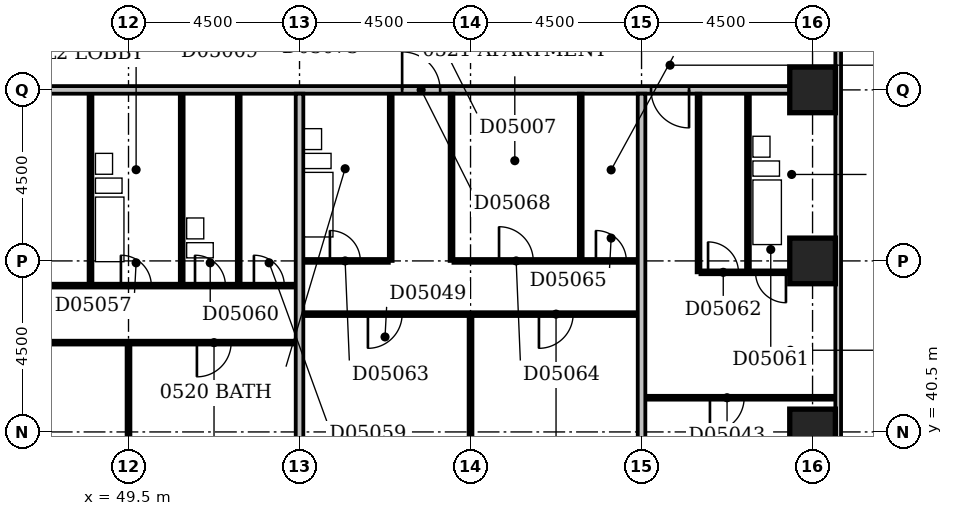
"""IFC4 building model, lengths in metres.
Left out: names, types, materials, properties, quantities, classifications, styles, units other than length and angle.
Written with IfcOpenShell. Run it as: python <this file> out.ifc"""

import sys

from ifc_helpers import new_model, si_unit, direction, frame, frame_2d, origin, origin_2d, place, context, subcontext, project, spatial, rectangle, extrude, element, fill, save


model = new_model("IFC4")
c1 = context("Model", 3, precision=1e-05, world=origin(), true_north=direction((0.0, 1.0)))
c2 = subcontext(c1, "Body", "Model", "MODEL_VIEW")
j1 = project(units=[si_unit("LENGTHUNIT", "METRE"), si_unit("PLANEANGLEUNIT", "RADIAN")], contexts=[c1])
p1 = place(None, origin())
s1 = spatial("IfcSite", under=j1, at=p1, CompositionType="ELEMENT")
p2 = place(p1, origin())
s2 = spatial("IfcBuilding", under=s1, at=p2, CompositionType="ELEMENT")
p3 = place(p2, frame((0.0, 0.0, 29.0)))
s3 = spatial("IfcBuildingStorey", under=s2, at=p3, CompositionType="ELEMENT", Elevation=29.0)
for number, where, z_axis, x_axis in (
    (1, (67.5, 40.5, -0.3), (0.0, 0.0, 1.0), (1.0, 0.0, 0.0)),
    (2, (67.5, 45.0, -0.3), (0.0, 0.0, 1.0), (1.0, 0.0, 0.0)),
    (3, (67.5, 49.5, -0.3), (0.0, 0.0, 1.0), (1.0, 0.0, 0.0)),
):
    element("IfcColumn", number, at=place(p3, frame(where, z_axis=z_axis, x_axis=x_axis)), inside=s3, PredefinedType="COLUMN", context=c2, shape_type="SweptSolid", body=[
        extrude(rectangle(XDim=1.2, YDim=1.2, at=origin_2d()), origin(), (0.0, 0.0, 1.0), 3.6),
    ])
p4 = place(p3, frame((68.175, 35.4, 0.0), z_axis=(0.0, 0.0, 1.0), x_axis=(0.0, 1.0, 0.0)))
e4 = element("IfcWall", 4, at=p4, inside=s3, PredefinedType="STANDARD", context=c2, shape_type="SweptSolid", body=[
    extrude(rectangle(XDim=23.85, YDim=0.15, at=frame_2d((11.925, 0.0))), origin(), (0.0, 0.0, 1.0), 2.7),
])
p5 = place(p4, frame((1.65, 0.0, 0.6)))
e5 = element("IfcOpeningElement", 5, at=p5, cuts=e4, PredefinedType="OPENING", context=c2, shape_type="SweptSolid", body=[
    extrude(rectangle(XDim=2.4, YDim=1.8, at=frame_2d((1.2, 0.9))), frame((0.0, 0.087, 0.0), z_axis=(0.0, -1.0, 0.0), x_axis=(1.0, 0.0, 0.0)), (0.0, 0.0, 1.0), 0.174),
])
p6 = place(p4, frame((19.65, 0.0, 0.6)))
e6 = element("IfcOpeningElement", 6, at=p6, cuts=e4, PredefinedType="OPENING", context=c2, shape_type="SweptSolid", body=[
    extrude(rectangle(XDim=2.4, YDim=1.8, at=frame_2d((1.2, 0.9))), frame((0.0, 0.087, 0.0), z_axis=(0.0, -1.0, 0.0), x_axis=(1.0, 0.0, 0.0)), (0.0, 0.0, 1.0), 0.174),
])
p7 = place(p3, frame((49.5, 36.6, 0.0), z_axis=(0.0, 0.0, 1.0), x_axis=(0.0, 1.0, 0.0)))
e7 = element("IfcWall", 7, at=p7, inside=s3, PredefinedType="PARTITIONING", context=c2, shape_type="SweptSolid", body=[
    extrude(rectangle(XDim=6.2, YDim=0.1, at=frame_2d((3.1, 0.0))), origin(), (0.0, 0.0, 1.0), 3.3),
])
p8 = place(p3, frame((54.0, 36.6, 0.0), z_axis=(0.0, 0.0, 1.0), x_axis=(0.0, 1.0, 0.0)))
e8 = element("IfcWall", 8, at=p8, inside=s3, PredefinedType="PARTITIONING", context=c2, shape_type="SweptSolid", body=[
    extrude(rectangle(XDim=12.8, YDim=0.2, at=frame_2d((6.4, 0.0))), origin(), (0.0, 0.0, 1.0), 2.6),
])
p9 = place(p3, frame((58.5, 36.6, 0.0), z_axis=(0.0, 0.0, 1.0), x_axis=(0.0, 1.0, 0.0)))
e9 = element("IfcWall", 9, at=p9, inside=s3, PredefinedType="PARTITIONING", context=c2, shape_type="SweptSolid", body=[
    extrude(rectangle(XDim=6.95, YDim=0.1, at=frame_2d((3.475, 0.0))), origin(), (0.0, 0.0, 1.0), 3.3),
])
p10 = place(p3, frame((63.0, 36.6, 0.0), z_axis=(0.0, 0.0, 1.0), x_axis=(0.0, 1.0, 0.0)))
e10 = element("IfcWall", 10, at=p10, inside=s3, PredefinedType="PARTITIONING", context=c2, shape_type="SweptSolid", body=[
    extrude(rectangle(XDim=12.8, YDim=0.2, at=frame_2d((6.4, 0.0))), origin(), (0.0, 0.0, 1.0), 2.4),
])
p11 = place(p3, frame((63.1, 41.4, 0.0), z_axis=(0.0, 0.0, 1.0), x_axis=(1.0, 0.0, 0.0)))
e11 = element("IfcWall", 11, at=p11, inside=s3, PredefinedType="PARTITIONING", context=c2, shape_type="SweptSolid", body=[
    extrude(rectangle(XDim=5.0, YDim=0.1, at=frame_2d((2.5, 0.0))), origin(), (0.0, 0.0, 1.0), 3.3),
])
p12 = place(p11, frame((1.7, 0.0, 0.0)))
e12 = element("IfcOpeningElement", 12, at=p12, cuts=e11, PredefinedType="OPENING", context=c2, shape_type="SweptSolid", body=[
    extrude(rectangle(XDim=0.9, YDim=2.1, at=frame_2d((0.45, 1.05))), frame((0.0, 0.062, 0.0), z_axis=(0.0, -1.0, 0.0), x_axis=(1.0, 0.0, 0.0)), (0.0, 0.0, 1.0), 0.124),
])
p13 = place(p3, frame((40.6, 42.85, 0.0), z_axis=(0.0, 0.0, 1.0), x_axis=(1.0, 0.0, 0.0)))
e13 = element("IfcWall", 13, at=p13, inside=s3, PredefinedType="PARTITIONING", context=c2, shape_type="SweptSolid", body=[
    extrude(rectangle(XDim=13.3, YDim=0.1, at=frame_2d((6.65, 0.0))), origin(), (0.0, 0.0, 1.0), 3.3),
])
p14 = place(p13, frame((3.9, 0.0, 0.0)))
e14 = element("IfcOpeningElement", 14, at=p14, cuts=e13, PredefinedType="OPENING", context=c2, shape_type="SweptSolid", body=[
    extrude(rectangle(XDim=0.9, YDim=2.1, at=frame_2d((0.45, 1.05))), frame((0.0, 0.062, 0.0), z_axis=(0.0, -1.0, 0.0), x_axis=(1.0, 0.0, 0.0)), (0.0, 0.0, 1.0), 0.124),
])
p15 = place(p13, frame((10.7, 0.0, 0.0)))
e15 = element("IfcOpeningElement", 15, at=p15, cuts=e13, PredefinedType="OPENING", context=c2, shape_type="SweptSolid", body=[
    extrude(rectangle(XDim=0.9, YDim=2.1, at=frame_2d((0.45, 1.05))), frame((0.0, 0.062, 0.0), z_axis=(0.0, -1.0, 0.0), x_axis=(1.0, 0.0, 0.0)), (0.0, 0.0, 1.0), 0.124),
])
p16 = place(p3, frame((54.1, 43.6, 0.0), z_axis=(0.0, 0.0, 1.0), x_axis=(1.0, 0.0, 0.0)))
e16 = element("IfcWall", 16, at=p16, inside=s3, PredefinedType="PARTITIONING", context=c2, shape_type="SweptSolid", body=[
    extrude(rectangle(XDim=8.8, YDim=0.1, at=frame_2d((4.4, 0.0))), origin(), (0.0, 0.0, 1.0), 3.3),
])
p17 = place(p16, frame((1.7, 0.0, 0.0)))
e17 = element("IfcOpeningElement", 17, at=p17, cuts=e16, PredefinedType="OPENING", context=c2, shape_type="SweptSolid", body=[
    extrude(rectangle(XDim=0.9, YDim=2.1, at=frame_2d((0.45, 1.05))), frame((0.0, 0.062, 0.0), z_axis=(0.0, -1.0, 0.0), x_axis=(1.0, 0.0, 0.0)), (0.0, 0.0, 1.0), 0.124),
])
p18 = place(p16, frame((6.2, 0.0, 0.0)))
e18 = element("IfcOpeningElement", 18, at=p18, cuts=e16, PredefinedType="OPENING", context=c2, shape_type="SweptSolid", body=[
    extrude(rectangle(XDim=0.9, YDim=2.1, at=frame_2d((0.45, 1.05))), frame((0.0, 0.062, 0.0), z_axis=(0.0, -1.0, 0.0), x_axis=(1.0, 0.0, 0.0)), (0.0, 0.0, 1.0), 0.124),
])
p19 = place(p3, frame((42.15, 44.35, 0.0), z_axis=(0.0, 0.0, 1.0), x_axis=(1.0, 0.0, 0.0)))
e19 = element("IfcWall", 19, at=p19, inside=s3, PredefinedType="PARTITIONING", context=c2, shape_type="SweptSolid", body=[
    extrude(rectangle(XDim=11.75, YDim=0.1, at=frame_2d((5.875, 0.0))), origin(), (0.0, 0.0, 1.0), 3.3),
])
p20 = place(p19, frame((7.15, 0.0, 0.0)))
e20 = element("IfcOpeningElement", 20, at=p20, cuts=e19, PredefinedType="OPENING", context=c2, shape_type="SweptSolid", body=[
    extrude(rectangle(XDim=0.8, YDim=2.1, at=frame_2d((0.4, 1.05))), frame((0.0, 0.062, 0.0), z_axis=(0.0, -1.0, 0.0), x_axis=(1.0, 0.0, 0.0)), (0.0, 0.0, 1.0), 0.124),
])
p21 = place(p19, frame((2.7, 0.0, 0.0)))
e21 = element("IfcOpeningElement", 21, at=p21, cuts=e19, PredefinedType="OPENING", context=c2, shape_type="SweptSolid", body=[
    extrude(rectangle(XDim=0.9, YDim=2.1, at=frame_2d((0.45, 1.05))), frame((0.0, 0.062, 0.0), z_axis=(0.0, -1.0, 0.0), x_axis=(1.0, 0.0, 0.0)), (0.0, 0.0, 1.0), 0.124),
])
p22 = place(p19, frame((10.65, 0.0, 0.0)))
e22 = element("IfcOpeningElement", 22, at=p22, cuts=e19, PredefinedType="OPENING", context=c2, shape_type="SweptSolid", body=[
    extrude(rectangle(XDim=0.8, YDim=2.1, at=frame_2d((0.4, 1.05))), frame((0.0, 0.062, 0.0), z_axis=(0.0, -1.0, 0.0), x_axis=(1.0, 0.0, 0.0)), (0.0, 0.0, 1.0), 0.124),
])
p23 = place(p19, frame((9.1, 0.0, 0.0)))
e23 = element("IfcOpeningElement", 23, at=p23, cuts=e19, PredefinedType="OPENING", context=c2, shape_type="SweptSolid", body=[
    extrude(rectangle(XDim=0.8, YDim=2.1, at=frame_2d((0.4, 1.05))), frame((0.0, 0.062, 0.0), z_axis=(0.0, -1.0, 0.0), x_axis=(1.0, 0.0, 0.0)), (0.0, 0.0, 1.0), 0.124),
])
for number, where, z_axis, x_axis in (
    (24, (48.5, 44.4, 0.0), (0.0, 0.0, 1.0), (0.0, 1.0, 0.0)),
    (25, (50.9, 44.4, 0.0), (0.0, 0.0, 1.0), (0.0, 1.0, 0.0)),
    (26, (52.4, 44.4, 0.0), (0.0, 0.0, 1.0), (0.0, 1.0, 0.0)),
):
    element("IfcWall", number, at=place(p3, frame(where, z_axis=z_axis, x_axis=x_axis)), inside=s3, PredefinedType="PLUMBINGWALL", context=c2, shape_type="SweptSolid", body=[
        extrude(rectangle(XDim=5.0, YDim=0.1, at=frame_2d((2.5, 0.0))), origin(), (0.0, 0.0, 1.0), 3.3),
    ])
p24 = place(p3, frame((64.5, 44.7, 0.0), z_axis=(0.0, 0.0, 1.0), x_axis=(0.0, 1.0, 0.0)))
e27 = element("IfcWall", 27, at=p24, inside=s3, PredefinedType="PARTITIONING", context=c2, shape_type="SweptSolid", body=[
    extrude(rectangle(XDim=4.7, YDim=0.1, at=frame_2d((2.35, 0.0))), origin(), (0.0, 0.0, 1.0), 3.3),
])
p25 = place(p3, frame((64.55, 44.7, 0.0), z_axis=(0.0, 0.0, 1.0), x_axis=(1.0, 0.0, 0.0)))
e28 = element("IfcWall", 28, at=p25, inside=s3, PredefinedType="PARTITIONING", context=c2, shape_type="SweptSolid", body=[
    extrude(rectangle(XDim=2.35, YDim=0.1, at=frame_2d((1.175, 0.0))), origin(), (0.0, 0.0, 1.0), 3.3),
])
p26 = place(p25, frame((1.45, 0.0, 0.0)))
e29 = element("IfcOpeningElement", 29, at=p26, cuts=e28, PredefinedType="OPENING", context=c2, shape_type="SweptSolid", body=[
    extrude(rectangle(XDim=0.8, YDim=2.1, at=frame_2d((0.4, 1.05))), frame((0.0, 0.062, 0.0), z_axis=(0.0, -1.0, 0.0), x_axis=(1.0, 0.0, 0.0)), (0.0, 0.0, 1.0), 0.124),
])
p27 = place(p25, frame((0.2, 0.0, 0.0)))
e30 = element("IfcOpeningElement", 30, at=p27, cuts=e28, PredefinedType="OPENING", context=c2, shape_type="SweptSolid", body=[
    extrude(rectangle(XDim=0.8, YDim=2.1, at=frame_2d((0.4, 1.05))), frame((0.0, 0.062, 0.0), z_axis=(0.0, -1.0, 0.0), x_axis=(1.0, 0.0, 0.0)), (0.0, 0.0, 1.0), 0.124),
])
p28 = place(p3, frame((65.8, 44.75, 0.0), z_axis=(0.0, 0.0, 1.0), x_axis=(0.0, 1.0, 0.0)))
e31 = element("IfcWall", 31, at=p28, inside=s3, PredefinedType="PLUMBINGWALL", context=c2, shape_type="SweptSolid", body=[
    extrude(rectangle(XDim=4.65, YDim=0.1, at=frame_2d((2.325, 0.0))), origin(), (0.0, 0.0, 1.0), 3.3),
])
p29 = place(p3, frame((54.1, 45.0, 0.0), z_axis=(0.0, 0.0, 1.0), x_axis=(1.0, 0.0, 0.0)))
e32 = element("IfcWall", 32, at=p29, inside=s3, PredefinedType="PARTITIONING", context=c2, shape_type="SweptSolid", body=[
    extrude(rectangle(XDim=2.25, YDim=0.1, at=frame_2d((1.125, 0.0))), origin(), (0.0, 0.0, 1.0), 3.3),
])
p30 = place(p29, frame((0.7, 0.0, 0.0)))
e33 = element("IfcOpeningElement", 33, at=p30, cuts=e32, PredefinedType="OPENING", context=c2, shape_type="SweptSolid", body=[
    extrude(rectangle(XDim=0.8, YDim=2.1, at=frame_2d((0.4, 1.05))), frame((0.0, 0.062, 0.0), z_axis=(0.0, -1.0, 0.0), x_axis=(1.0, 0.0, 0.0)), (0.0, 0.0, 1.0), 0.124),
])
p31 = place(p3, frame((56.4, 45.0, 0.0), z_axis=(0.0, 0.0, 1.0), x_axis=(0.0, 1.0, 0.0)))
e34 = element("IfcWall", 34, at=p31, inside=s3, PredefinedType="PLUMBINGWALL", context=c2, shape_type="SweptSolid", body=[
    extrude(rectangle(XDim=4.4, YDim=0.1, at=frame_2d((2.2, 0.0))), origin(), (0.0, 0.0, 1.0), 3.3),
])
p32 = place(p3, frame((58.0, 45.0, 0.0), z_axis=(0.0, 0.0, 1.0), x_axis=(0.0, 1.0, 0.0)))
e35 = element("IfcWall", 35, at=p32, inside=s3, PredefinedType="PARTITIONING", context=c2, shape_type="SweptSolid", body=[
    extrude(rectangle(XDim=4.4, YDim=0.1, at=frame_2d((2.2, 0.0))), origin(), (0.0, 0.0, 1.0), 3.3),
])
p33 = place(p3, frame((58.05, 45.0, 0.0), z_axis=(0.0, 0.0, 1.0), x_axis=(1.0, 0.0, 0.0)))
e36 = element("IfcWall", 36, at=p33, inside=s3, PredefinedType="PARTITIONING", context=c2, shape_type="SweptSolid", body=[
    extrude(rectangle(XDim=4.85, YDim=0.1, at=frame_2d((2.425, 0.0))), origin(), (0.0, 0.0, 1.0), 3.3),
])
p34 = place(p33, frame((1.2, 0.0, 0.0)))
e37 = element("IfcOpeningElement", 37, at=p34, cuts=e36, PredefinedType="OPENING", context=c2, shape_type="SweptSolid", body=[
    extrude(rectangle(XDim=0.9, YDim=2.1, at=frame_2d((0.45, 1.05))), frame((0.0, 0.062, 0.0), z_axis=(0.0, -1.0, 0.0), x_axis=(1.0, 0.0, 0.0)), (0.0, 0.0, 1.0), 0.124),
])
p35 = place(p33, frame((3.75, 0.0, 0.0)))
e38 = element("IfcOpeningElement", 38, at=p35, cuts=e36, PredefinedType="OPENING", context=c2, shape_type="SweptSolid", body=[
    extrude(rectangle(XDim=0.8, YDim=2.1, at=frame_2d((0.4, 1.05))), frame((0.0, 0.062, 0.0), z_axis=(0.0, -1.0, 0.0), x_axis=(1.0, 0.0, 0.0)), (0.0, 0.0, 1.0), 0.124),
])
p36 = place(p3, frame((61.4, 45.05, 0.0), z_axis=(0.0, 0.0, 1.0), x_axis=(0.0, 1.0, 0.0)))
e39 = element("IfcWall", 39, at=p36, inside=s3, PredefinedType="PARTITIONING", context=c2, shape_type="SweptSolid", body=[
    extrude(rectangle(XDim=4.35, YDim=0.1, at=frame_2d((2.175, 0.0))), origin(), (0.0, 0.0, 1.0), 3.3),
])
p37 = place(p3, frame((9.1, 49.5, 0.0), z_axis=(0.0, 0.0, 1.0), x_axis=(1.0, 0.0, 0.0)))
e40 = element("IfcWall", 40, at=p37, inside=s3, PredefinedType="PARTITIONING", context=c2, shape_type="SweptSolid", body=[
    extrude(rectangle(XDim=57.8, YDim=0.2, at=frame_2d((28.9, 0.0))), origin(), (0.0, 0.0, 1.0), 3.3),
])
p38 = place(p37, frame((20.6, 0.0, 0.0)))
e41 = element("IfcOpeningElement", 41, at=p38, cuts=e40, PredefinedType="OPENING", context=c2, shape_type="SweptSolid", body=[
    extrude(rectangle(XDim=1.0, YDim=2.1, at=frame_2d((0.5, 1.05))), frame((0.0, 0.112, 0.0), z_axis=(0.0, -1.0, 0.0), x_axis=(1.0, 0.0, 0.0)), (0.0, 0.0, 1.0), 0.224),
])
p39 = place(p37, frame((31.7, 0.0, 0.0)))
e42 = element("IfcOpeningElement", 42, at=p39, cuts=e40, PredefinedType="OPENING", context=c2, shape_type="SweptSolid", body=[
    extrude(rectangle(XDim=1.0, YDim=2.1, at=frame_2d((0.5, 1.05))), frame((0.0, 0.112, 0.0), z_axis=(0.0, -1.0, 0.0), x_axis=(1.0, 0.0, 0.0)), (0.0, 0.0, 1.0), 0.224),
])
p40 = place(p37, frame((47.6, 0.0, 0.0)))
e43 = element("IfcOpeningElement", 43, at=p40, cuts=e40, PredefinedType="OPENING", context=c2, shape_type="SweptSolid", body=[
    extrude(rectangle(XDim=1.0, YDim=2.1, at=frame_2d((0.5, 1.05))), frame((0.0, 0.112, 0.0), z_axis=(0.0, -1.0, 0.0), x_axis=(1.0, 0.0, 0.0)), (0.0, 0.0, 1.0), 0.224),
])
p41 = place(p37, frame((54.15, 0.0, 0.0)))
e44 = element("IfcOpeningElement", 44, at=p41, cuts=e40, PredefinedType="OPENING", context=c2, shape_type="SweptSolid", body=[
    extrude(rectangle(XDim=1.0, YDim=2.1, at=frame_2d((0.5, 1.05))), frame((0.0, 0.112, 0.0), z_axis=(0.0, -1.0, 0.0), x_axis=(1.0, 0.0, 0.0)), (0.0, 0.0, 1.0), 0.224),
])
p42 = place(p37, frame((10.65, 0.0, 0.0)))
e45 = element("IfcOpeningElement", 45, at=p42, cuts=e40, PredefinedType="OPENING", context=c2, shape_type="SweptSolid", body=[
    extrude(rectangle(XDim=0.9, YDim=2.1, at=frame_2d((0.45, 1.05))), frame((0.0, 0.112, 0.0), z_axis=(0.0, -1.0, 0.0), x_axis=(1.0, 0.0, 0.0)), (0.0, 0.0, 1.0), 0.224),
])
p43 = place(p12, frame((0.9, 0.0, 0.0), z_axis=(0.0, 0.0, 1.0), x_axis=(-1.0, 0.0, 0.0)))
e46 = element("IfcDoor", 46, at=p43, inside=s3, OperationType="SINGLE_SWING_RIGHT", PredefinedType="DOOR", context=c2, shape_type="SweptSolid", body=[
    extrude(rectangle(XDim=0.9, YDim=2.1, at=frame_2d((0.45, 1.05))), frame((0.0, 0.025, 0.0), z_axis=(0.0, -1.0, 0.0), x_axis=(1.0, 0.0, 0.0)), (0.0, 0.0, 1.0), 0.05),
])
fill(e12, e46)
p44 = place(p15, frame((0.9, 0.0, 0.0), z_axis=(0.0, 0.0, 1.0), x_axis=(-1.0, 0.0, 0.0)))
e47 = element("IfcDoor", 47, at=p44, inside=s3, OperationType="SINGLE_SWING_RIGHT", PredefinedType="DOOR", context=c2, shape_type="SweptSolid", body=[
    extrude(rectangle(XDim=0.9, YDim=2.1, at=frame_2d((0.45, 1.05))), frame((0.0, 0.025, 0.0), z_axis=(0.0, -1.0, 0.0), x_axis=(1.0, 0.0, 0.0)), (0.0, 0.0, 1.0), 0.05),
])
fill(e15, e47)
p45 = place(p17, frame((0.9, 0.0, 0.0), z_axis=(0.0, 0.0, 1.0), x_axis=(-1.0, 0.0, 0.0)))
e48 = element("IfcDoor", 48, at=p45, inside=s3, OperationType="SINGLE_SWING_RIGHT", PredefinedType="DOOR", context=c2, shape_type="SweptSolid", body=[
    extrude(rectangle(XDim=0.9, YDim=2.1, at=frame_2d((0.45, 1.05))), frame((0.0, 0.025, 0.0), z_axis=(0.0, -1.0, 0.0), x_axis=(1.0, 0.0, 0.0)), (0.0, 0.0, 1.0), 0.05),
])
fill(e17, e48)
p46 = place(p18, frame((0.9, 0.0, 0.0), z_axis=(0.0, 0.0, 1.0), x_axis=(-1.0, 0.0, 0.0)))
e49 = element("IfcDoor", 49, at=p46, inside=s3, OperationType="SINGLE_SWING_RIGHT", PredefinedType="DOOR", context=c2, shape_type="SweptSolid", body=[
    extrude(rectangle(XDim=0.9, YDim=2.1, at=frame_2d((0.45, 1.05))), frame((0.0, 0.025, 0.0), z_axis=(0.0, -1.0, 0.0), x_axis=(1.0, 0.0, 0.0)), (0.0, 0.0, 1.0), 0.05),
])
fill(e18, e49)
p47 = place(p20, origin())
e50 = element("IfcDoor", 50, at=p47, inside=s3, OperationType="SINGLE_SWING_LEFT", PredefinedType="DOOR", context=c2, shape_type="SweptSolid", body=[
    extrude(rectangle(XDim=0.8, YDim=2.1, at=frame_2d((0.4, 1.05))), frame((0.0, 0.025, 0.0), z_axis=(0.0, -1.0, 0.0), x_axis=(1.0, 0.0, 0.0)), (0.0, 0.0, 1.0), 0.05),
])
fill(e20, e50)
p48 = place(p22, origin())
e51 = element("IfcDoor", 51, at=p48, inside=s3, OperationType="SINGLE_SWING_LEFT", PredefinedType="DOOR", context=c2, shape_type="SweptSolid", body=[
    extrude(rectangle(XDim=0.8, YDim=2.1, at=frame_2d((0.4, 1.05))), frame((0.0, 0.025, 0.0), z_axis=(0.0, -1.0, 0.0), x_axis=(1.0, 0.0, 0.0)), (0.0, 0.0, 1.0), 0.05),
])
fill(e22, e51)
p49 = place(p23, origin())
e52 = element("IfcDoor", 52, at=p49, inside=s3, OperationType="SINGLE_SWING_LEFT", PredefinedType="DOOR", context=c2, shape_type="SweptSolid", body=[
    extrude(rectangle(XDim=0.8, YDim=2.1, at=frame_2d((0.4, 1.05))), frame((0.0, 0.025, 0.0), z_axis=(0.0, -1.0, 0.0), x_axis=(1.0, 0.0, 0.0)), (0.0, 0.0, 1.0), 0.05),
])
fill(e23, e52)
p50 = place(p26, origin())
e53 = element("IfcDoor", 53, at=p50, inside=s3, OperationType="SINGLE_SWING_RIGHT", PredefinedType="DOOR", context=c2, shape_type="SweptSolid", body=[
    extrude(rectangle(XDim=0.8, YDim=2.1, at=frame_2d((0.4, 1.05))), frame((0.0, 0.025, 0.0), z_axis=(0.0, -1.0, 0.0), x_axis=(1.0, 0.0, 0.0)), (0.0, 0.0, 1.0), 0.05),
])
fill(e29, e53)
p51 = place(p27, origin())
e54 = element("IfcDoor", 54, at=p51, inside=s3, OperationType="SINGLE_SWING_LEFT", PredefinedType="DOOR", context=c2, shape_type="SweptSolid", body=[
    extrude(rectangle(XDim=0.8, YDim=2.1, at=frame_2d((0.4, 1.05))), frame((0.0, 0.025, 0.0), z_axis=(0.0, -1.0, 0.0), x_axis=(1.0, 0.0, 0.0)), (0.0, 0.0, 1.0), 0.05),
])
fill(e30, e54)
p52 = place(p30, origin())
e55 = element("IfcDoor", 55, at=p52, inside=s3, OperationType="SINGLE_SWING_LEFT", PredefinedType="DOOR", context=c2, shape_type="SweptSolid", body=[
    extrude(rectangle(XDim=0.8, YDim=2.1, at=frame_2d((0.4, 1.05))), frame((0.0, 0.025, 0.0), z_axis=(0.0, -1.0, 0.0), x_axis=(1.0, 0.0, 0.0)), (0.0, 0.0, 1.0), 0.05),
])
fill(e33, e55)
p53 = place(p34, origin())
e56 = element("IfcDoor", 56, at=p53, inside=s3, OperationType="SINGLE_SWING_LEFT", PredefinedType="DOOR", context=c2, shape_type="SweptSolid", body=[
    extrude(rectangle(XDim=0.9, YDim=2.1, at=frame_2d((0.45, 1.05))), frame((0.0, 0.025, 0.0), z_axis=(0.0, -1.0, 0.0), x_axis=(1.0, 0.0, 0.0)), (0.0, 0.0, 1.0), 0.05),
])
fill(e37, e56)
p54 = place(p35, origin())
e57 = element("IfcDoor", 57, at=p54, inside=s3, OperationType="SINGLE_SWING_LEFT", PredefinedType="DOOR", context=c2, shape_type="SweptSolid", body=[
    extrude(rectangle(XDim=0.8, YDim=2.1, at=frame_2d((0.4, 1.05))), frame((0.0, 0.025, 0.0), z_axis=(0.0, -1.0, 0.0), x_axis=(1.0, 0.0, 0.0)), (0.0, 0.0, 1.0), 0.05),
])
fill(e38, e57)
p55 = place(p40, origin())
e58 = element("IfcDoor", 58, at=p55, inside=s3, OperationType="SINGLE_SWING_LEFT", PredefinedType="DOOR", context=c2, shape_type="SweptSolid", body=[
    extrude(rectangle(XDim=1.0, YDim=2.1, at=frame_2d((0.5, 1.05))), frame((0.0, 0.025, 0.0), z_axis=(0.0, -1.0, 0.0), x_axis=(1.0, 0.0, 0.0)), (0.0, 0.0, 1.0), 0.05),
])
fill(e43, e58)
p56 = place(p41, origin())
e59 = element("IfcDoor", 59, at=p56, inside=s3, OperationType="SINGLE_SWING_RIGHT", PredefinedType="DOOR", context=c2, shape_type="SweptSolid", body=[
    extrude(rectangle(XDim=1.0, YDim=2.1, at=frame_2d((0.5, 1.05))), frame((0.0, 0.025, 0.0), z_axis=(0.0, -1.0, 0.0), x_axis=(1.0, 0.0, 0.0)), (0.0, 0.0, 1.0), 0.05),
])
fill(e44, e59)
save(model, sys.argv[1])
